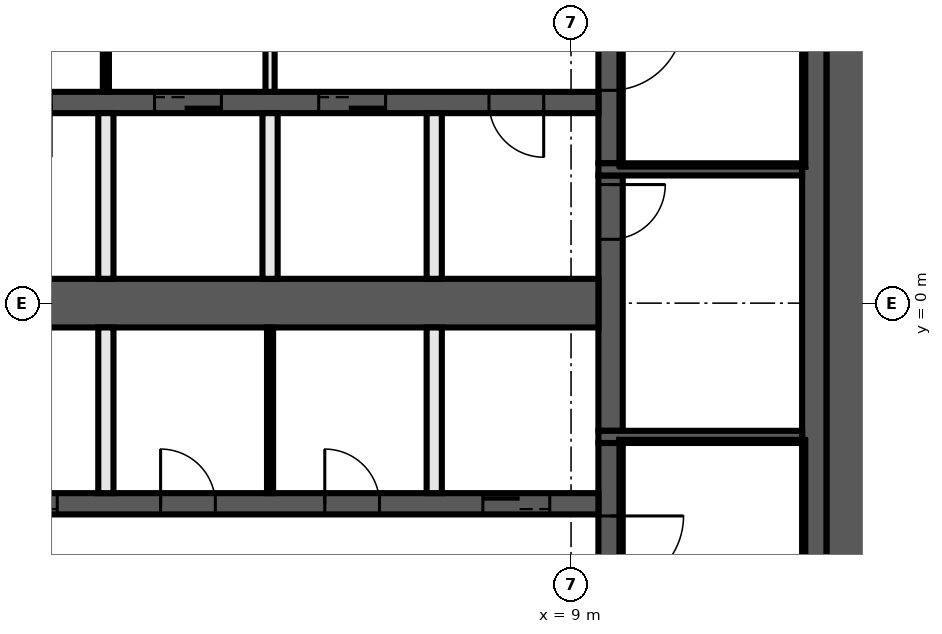
"""IFC4 building model, lengths in metres.
Left out: names, types, materials, properties, quantities, classifications, styles, units other than length and angle.
Written with IfcOpenShell. Run it as: python <this file> out.ifc"""

import sys

from ifc_helpers import new_model, si_unit, direction, frame, frame_2d, origin, place, context, subcontext, project, spatial, rectangle, extrude, element, fill, save


model = new_model("IFC4")
c1 = context("Model", 3, precision=1e-05, world=origin(), true_north=direction((0.0, 1.0)))
c2 = subcontext(c1, "Body", "Model", "MODEL_VIEW")
j1 = project(units=[si_unit("LENGTHUNIT", "METRE"), si_unit("PLANEANGLEUNIT", "RADIAN")], contexts=[c1])
p1 = place(None, origin())
s1 = spatial("IfcSite", under=j1, at=p1, CompositionType="ELEMENT")
p2 = place(p1, origin())
s2 = spatial("IfcBuilding", under=s1, at=p2, CompositionType="ELEMENT")
p3 = place(p2, frame((0.0, 0.0, 220.6)))
s3 = spatial("IfcBuildingStorey", under=s2, at=p3, CompositionType="ELEMENT", Elevation=220.6)
p4 = place(p3, frame((13.6, 10.2, 0.0), z_axis=(0.0, 0.0, 1.0), x_axis=(0.0, -1.0, 0.0)))
e1 = element("IfcWall", 1, at=p4, inside=s3, PredefinedType="SHEAR", context=c2, shape_type="SweptSolid", body=[
    extrude(rectangle(XDim=20.4, YDim=0.8, at=frame_2d((10.2, 0.0))), origin(), (0.0, 0.0, 1.0), 7.55),
])
p5 = place(p3, frame((13.0, 9.8, 0.0), z_axis=(0.0, 0.0, 1.0), x_axis=(0.0, -1.0, 0.0)))
e2 = element("IfcWall", 2, at=p5, inside=s3, PredefinedType="SHEAR", context=c2, shape_type="SweptSolid", body=[
    extrude(rectangle(XDim=19.6, YDim=0.4, at=frame_2d((9.8, 0.0))), origin(), (0.0, 0.0, 1.0), 7.55),
])
p6 = place(p3, frame((9.65, -2.3, 0.0), z_axis=(0.0, 0.0, 1.0), x_axis=(0.0, -1.0, 0.0)))
e3 = element("IfcWall", 3, at=p6, inside=s3, PredefinedType="SHEAR", context=c2, shape_type="SweptSolid", body=[
    extrude(rectangle(XDim=7.5, YDim=0.4, at=frame_2d((3.75, 0.0))), origin(), (0.0, 0.0, 1.0), 7.55),
])
p7 = place(p6, frame((1.2, 0.0, 0.0)))
e4 = element("IfcOpeningElement", 4, at=p7, cuts=e3, PredefinedType="OPENING", context=c2, shape_type="SweptSolid", body=[
    extrude(rectangle(XDim=1.2, YDim=2.1, at=frame_2d((0.6, 1.05))), frame((0.0, 0.21, 0.0), z_axis=(0.0, -1.0, 0.0), x_axis=(1.0, 0.0, 0.0)), (0.0, 0.0, 1.0), 0.42),
])
p8 = place(p3, frame((9.65, 2.1, 0.0), z_axis=(0.0, 0.0, 1.0), x_axis=(0.0, -1.0, 0.0)))
e5 = element("IfcWall", 5, at=p8, inside=s3, PredefinedType="SHEAR", context=c2, shape_type="SweptSolid", body=[
    extrude(rectangle(XDim=4.2, YDim=0.4, at=frame_2d((2.1, 0.0))), origin(), (0.0, 0.0, 1.0), 7.55),
])
p9 = place(p8, frame((0.15, 0.0, 0.0)))
e6 = element("IfcOpeningElement", 6, at=p9, cuts=e5, PredefinedType="OPENING", context=c2, shape_type="SweptSolid", body=[
    extrude(rectangle(XDim=0.9, YDim=2.1, at=frame_2d((0.45, 1.05))), frame((0.0, 0.21, 0.0), z_axis=(0.0, -1.0, 0.0), x_axis=(1.0, 0.0, 0.0)), (0.0, 0.0, 1.0), 0.42),
])
p10 = place(p3, frame((9.65, 9.8, 0.0), z_axis=(0.0, 0.0, 1.0), x_axis=(0.0, -1.0, 0.0)))
e7 = element("IfcWall", 7, at=p10, inside=s3, PredefinedType="SHEAR", context=c2, shape_type="SweptSolid", body=[
    extrude(rectangle(XDim=7.5, YDim=0.4, at=frame_2d((3.75, 0.0))), origin(), (0.0, 0.0, 1.0), 7.55),
])
p11 = place(p10, frame((5.1, 0.0, 0.0)))
e8 = element("IfcOpeningElement", 8, at=p11, cuts=e7, PredefinedType="OPENING", context=c2, shape_type="SweptSolid", body=[
    extrude(rectangle(XDim=1.2, YDim=2.1, at=frame_2d((0.6, 1.05))), frame((0.0, 0.21, 0.0), z_axis=(0.0, -1.0, 0.0), x_axis=(1.0, 0.0, 0.0)), (0.0, 0.0, 1.0), 0.42),
])
for number, where, z_axis, x_axis in (
    (9, (9.45, 2.2, 0.0), (0.0, 0.0, 1.0), (1.0, 0.0, 0.0)),
    (10, (9.45, -2.2, 0.0), (0.0, 0.0, 1.0), (1.0, 0.0, 0.0)),
):
    element("IfcWall", number, at=place(p3, frame(where, z_axis=z_axis, x_axis=x_axis)), inside=s3, PredefinedType="SHEAR", context=c2, shape_type="SweptSolid", body=[
        extrude(rectangle(XDim=3.35, YDim=0.2, at=frame_2d((1.675, 0.0))), origin(), (0.0, 0.0, 1.0), 7.55),
    ])
p12 = place(p3, frame((9.45, 3.3, 0.0), z_axis=(0.0, 0.0, 1.0), x_axis=(-1.0, 0.0, 0.0)))
e11 = element("IfcWall", 11, at=p12, inside=s3, PredefinedType="SHEAR", context=c2, shape_type="SweptSolid", body=[
    extrude(rectangle(XDim=18.9, YDim=0.35, at=frame_2d((9.45, 0.0))), origin(), (0.0, 0.0, 1.0), 7.55),
])
p13 = place(p12, frame((6.2, 0.0, 0.0)))
e12 = element("IfcOpeningElement", 12, at=p13, cuts=e11, PredefinedType="OPENING", context=c2, shape_type="SweptSolid", body=[
    extrude(rectangle(XDim=1.1, YDim=2.1, at=frame_2d((0.55, 1.05))), frame((0.0, 0.185, 0.0), z_axis=(0.0, -1.0, 0.0), x_axis=(1.0, 0.0, 0.0)), (0.0, 0.0, 1.0), 0.37),
])
p14 = place(p12, frame((3.5, 0.0, 0.0)))
e13 = element("IfcOpeningElement", 13, at=p14, cuts=e11, PredefinedType="OPENING", context=c2, shape_type="SweptSolid", body=[
    extrude(rectangle(XDim=1.1, YDim=2.1, at=frame_2d((0.55, 1.05))), frame((0.0, 0.185, 0.0), z_axis=(0.0, -1.0, 0.0), x_axis=(1.0, 0.0, 0.0)), (0.0, 0.0, 1.0), 0.37),
])
p15 = place(p12, frame((0.9, 0.0, 0.0)))
e14 = element("IfcOpeningElement", 14, at=p15, cuts=e11, PredefinedType="OPENING", context=c2, shape_type="SweptSolid", body=[
    extrude(rectangle(XDim=0.9, YDim=2.1, at=frame_2d((0.45, 1.05))), frame((0.0, 0.185, 0.0), z_axis=(0.0, -1.0, 0.0), x_axis=(1.0, 0.0, 0.0)), (0.0, 0.0, 1.0), 0.37),
])
p16 = place(p12, frame((14.4, 0.0, 0.0)))
e15 = element("IfcOpeningElement", 15, at=p16, cuts=e11, PredefinedType="OPENING", context=c2, shape_type="SweptSolid", body=[
    extrude(rectangle(XDim=0.9, YDim=2.1, at=frame_2d((0.45, 1.05))), frame((0.0, 0.185, 0.0), z_axis=(0.0, -1.0, 0.0), x_axis=(1.0, 0.0, 0.0)), (0.0, 0.0, 1.0), 0.37),
])
p17 = place(p12, frame((9.0, 0.0, 0.0)))
e16 = element("IfcOpeningElement", 16, at=p17, cuts=e11, PredefinedType="OPENING", context=c2, shape_type="SweptSolid", body=[
    extrude(rectangle(XDim=0.9, YDim=2.1, at=frame_2d((0.45, 1.05))), frame((0.0, 0.185, 0.0), z_axis=(0.0, -1.0, 0.0), x_axis=(1.0, 0.0, 0.0)), (0.0, 0.0, 1.0), 0.37),
])
p18 = place(p3, frame((-9.45, -3.3, 0.0), z_axis=(0.0, 0.0, 1.0), x_axis=(1.0, 0.0, 0.0)))
e17 = element("IfcWall", 17, at=p18, inside=s3, PredefinedType="SHEAR", context=c2, shape_type="SweptSolid", body=[
    extrude(rectangle(XDim=18.9, YDim=0.35, at=frame_2d((9.45, 0.0))), origin(), (0.0, 0.0, 1.0), 7.55),
])
p19 = place(p18, frame((0.8, 0.0, 0.0)))
e18 = element("IfcOpeningElement", 18, at=p19, cuts=e17, PredefinedType="OPENING", context=c2, shape_type="SweptSolid", body=[
    extrude(rectangle(XDim=1.1, YDim=2.1, at=frame_2d((0.55, 1.05))), frame((0.0, 0.185, 0.0), z_axis=(0.0, -1.0, 0.0), x_axis=(1.0, 0.0, 0.0)), (0.0, 0.0, 1.0), 0.37),
])
p20 = place(p18, frame((3.5, 0.0, 0.0)))
e19 = element("IfcOpeningElement", 19, at=p20, cuts=e17, PredefinedType="OPENING", context=c2, shape_type="SweptSolid", body=[
    extrude(rectangle(XDim=1.1, YDim=2.1, at=frame_2d((0.55, 1.05))), frame((0.0, 0.185, 0.0), z_axis=(0.0, -1.0, 0.0), x_axis=(1.0, 0.0, 0.0)), (0.0, 0.0, 1.0), 0.37),
])
p21 = place(p18, frame((6.2, 0.0, 0.0)))
e20 = element("IfcOpeningElement", 20, at=p21, cuts=e17, PredefinedType="OPENING", context=c2, shape_type="SweptSolid", body=[
    extrude(rectangle(XDim=1.1, YDim=2.1, at=frame_2d((0.55, 1.05))), frame((0.0, 0.185, 0.0), z_axis=(0.0, -1.0, 0.0), x_axis=(1.0, 0.0, 0.0)), (0.0, 0.0, 1.0), 0.37),
])
p22 = place(p18, frame((8.9, 0.0, 0.0)))
e21 = element("IfcOpeningElement", 21, at=p22, cuts=e17, PredefinedType="OPENING", context=c2, shape_type="SweptSolid", body=[
    extrude(rectangle(XDim=1.1, YDim=2.1, at=frame_2d((0.55, 1.05))), frame((0.0, 0.185, 0.0), z_axis=(0.0, -1.0, 0.0), x_axis=(1.0, 0.0, 0.0)), (0.0, 0.0, 1.0), 0.37),
])
p23 = place(p18, frame((17.0, 0.0, 0.0)))
e22 = element("IfcOpeningElement", 22, at=p23, cuts=e17, PredefinedType="OPENING", context=c2, shape_type="SweptSolid", body=[
    extrude(rectangle(XDim=1.1, YDim=2.1, at=frame_2d((0.55, 1.05))), frame((0.0, 0.185, 0.0), z_axis=(0.0, -1.0, 0.0), x_axis=(1.0, 0.0, 0.0)), (0.0, 0.0, 1.0), 0.37),
])
p24 = place(p18, frame((11.7, 0.0, 0.0)))
e23 = element("IfcOpeningElement", 23, at=p24, cuts=e17, PredefinedType="OPENING", context=c2, shape_type="SweptSolid", body=[
    extrude(rectangle(XDim=0.9, YDim=2.1, at=frame_2d((0.45, 1.05))), frame((0.0, 0.185, 0.0), z_axis=(0.0, -1.0, 0.0), x_axis=(1.0, 0.0, 0.0)), (0.0, 0.0, 1.0), 0.37),
])
p25 = place(p18, frame((14.4, 0.0, 0.0)))
e24 = element("IfcOpeningElement", 24, at=p25, cuts=e17, PredefinedType="OPENING", context=c2, shape_type="SweptSolid", body=[
    extrude(rectangle(XDim=0.9, YDim=2.1, at=frame_2d((0.45, 1.05))), frame((0.0, 0.185, 0.0), z_axis=(0.0, -1.0, 0.0), x_axis=(1.0, 0.0, 0.0)), (0.0, 0.0, 1.0), 0.37),
])
p26 = place(p3, frame((-9.45, 0.0, 0.0), z_axis=(0.0, 0.0, 1.0), x_axis=(1.0, 0.0, 0.0)))
e25 = element("IfcWall", 25, at=p26, inside=s3, PredefinedType="SHEAR", context=c2, shape_type="SweptSolid", body=[
    extrude(rectangle(XDim=18.9, YDim=0.8, at=frame_2d((9.45, 0.0))), origin(), (0.0, 0.0, 1.0), 7.55),
])
for number, where, z_axis, x_axis in (
    (26, (6.75, -3.125, 0.0), (0.0, 0.0, 1.0), (0.0, 1.0, 0.0)),
    (27, (6.75, 0.4, 0.0), (0.0, 0.0, 1.0), (0.0, 1.0, 0.0)),
):
    element("IfcWall", number, at=place(p3, frame(where, z_axis=z_axis, x_axis=x_axis)), inside=s3, PredefinedType="SOLIDWALL", context=c2, shape_type="SweptSolid", body=[
        extrude(rectangle(XDim=2.725, YDim=0.25, at=frame_2d((1.363, 0.0))), origin(), (0.0, 0.0, 1.0), 7.55),
    ])
p27 = place(p3, frame((4.05, 6.725, 0.0), z_axis=(0.0, 0.0, 1.0), x_axis=(0.0, -1.0, 0.0)))
e28 = element("IfcWall", 28, at=p27, inside=s3, PredefinedType="PARTITIONING", context=c2, shape_type="SweptSolid", body=[
    extrude(rectangle(XDim=3.25, YDim=0.15, at=frame_2d((1.625, 0.0))), origin(), (0.0, 0.0, 1.0), 7.55),
])
p28 = place(p27, frame((1.025, 0.0, 0.0)))
e29 = element("IfcOpeningElement", 29, at=p28, cuts=e28, PredefinedType="OPENING", context=c2, shape_type="SweptSolid", body=[
    extrude(rectangle(XDim=1.2, YDim=2.1, at=frame_2d((0.6, 1.05))), frame((0.0, 0.085, 0.0), z_axis=(0.0, -1.0, 0.0), x_axis=(1.0, 0.0, 0.0)), (0.0, 0.0, 1.0), 0.17),
])
p29 = place(p3, frame((4.05, -3.125, 0.0), z_axis=(0.0, 0.0, 1.0), x_axis=(0.0, 1.0, 0.0)))
e30 = element("IfcWall", 30, at=p29, inside=s3, PredefinedType="PARTITIONING", context=c2, shape_type="SweptSolid", body=[
    extrude(rectangle(XDim=2.725, YDim=0.1, at=frame_2d((1.363, 0.0))), origin(), (0.0, 0.0, 1.0), 7.55),
])
p30 = place(p3, frame((4.05, 0.4, 0.0), z_axis=(0.0, 0.0, 1.0), x_axis=(0.0, 1.0, 0.0)))
e31 = element("IfcWall", 31, at=p30, inside=s3, PredefinedType="SOLIDWALL", context=c2, shape_type="SweptSolid", body=[
    extrude(rectangle(XDim=2.725, YDim=0.25, at=frame_2d((1.363, 0.0))), origin(), (0.0, 0.0, 1.0), 7.55),
])
p31 = place(p3, frame((1.35, 6.725, 0.0), z_axis=(0.0, 0.0, 1.0), x_axis=(0.0, -1.0, 0.0)))
e32 = element("IfcWall", 32, at=p31, inside=s3, PredefinedType="PARTITIONING", context=c2, shape_type="SweptSolid", body=[
    extrude(rectangle(XDim=3.25, YDim=0.1, at=frame_2d((1.625, 0.0))), origin(), (0.0, 0.0, 1.0), 7.55),
])
p32 = place(p31, frame((1.025, 0.0, 0.0)))
e33 = element("IfcOpeningElement", 33, at=p32, cuts=e32, PredefinedType="OPENING", context=c2, shape_type="SweptSolid", body=[
    extrude(rectangle(XDim=1.2, YDim=2.1, at=frame_2d((0.6, 1.05))), frame((0.0, 0.06, 0.0), z_axis=(0.0, -1.0, 0.0), x_axis=(1.0, 0.0, 0.0)), (0.0, 0.0, 1.0), 0.12),
])
for number, where, z_axis, x_axis in (
    (34, (1.35, -3.125, 0.0), (0.0, 0.0, 1.0), (0.0, 1.0, 0.0)),
    (35, (1.35, 0.4, 0.0), (0.0, 0.0, 1.0), (0.0, 1.0, 0.0)),
):
    element("IfcWall", number, at=place(p3, frame(where, z_axis=z_axis, x_axis=x_axis)), inside=s3, PredefinedType="SOLIDWALL", context=c2, shape_type="SweptSolid", body=[
        extrude(rectangle(XDim=2.725, YDim=0.25, at=frame_2d((1.363, 0.0))), origin(), (0.0, 0.0, 1.0), 7.55),
    ])
p33 = place(p9, origin())
e36 = element("IfcDoor", 36, at=p33, inside=s3, OperationType="SINGLE_SWING_RIGHT", PredefinedType="DOOR", context=c2, shape_type="SweptSolid", body=[
    extrude(rectangle(XDim=0.9, YDim=2.1, at=frame_2d((0.45, 1.05))), frame((0.0, 0.025, 0.0), z_axis=(0.0, -1.0, 0.0), x_axis=(1.0, 0.0, 0.0)), (0.0, 0.0, 1.0), 0.05),
])
fill(e6, e36)
p34 = place(p13, origin())
e37 = element("IfcDoor", 37, at=p34, inside=s3, OperationType="DOUBLE_DOOR_SLIDING", PredefinedType="DOOR", context=c2, shape_type="SweptSolid", body=[
    extrude(rectangle(XDim=1.1, YDim=2.1, at=frame_2d((0.55, 1.05))), frame((0.0, 0.025, 0.0), z_axis=(0.0, -1.0, 0.0), x_axis=(1.0, 0.0, 0.0)), (0.0, 0.0, 1.0), 0.05),
])
fill(e12, e37)
p35 = place(p14, origin())
e38 = element("IfcDoor", 38, at=p35, inside=s3, OperationType="DOUBLE_DOOR_SLIDING", PredefinedType="DOOR", context=c2, shape_type="SweptSolid", body=[
    extrude(rectangle(XDim=1.1, YDim=2.1, at=frame_2d((0.55, 1.05))), frame((0.0, 0.025, 0.0), z_axis=(0.0, -1.0, 0.0), x_axis=(1.0, 0.0, 0.0)), (0.0, 0.0, 1.0), 0.05),
])
fill(e13, e38)
p36 = place(p15, origin())
e39 = element("IfcDoor", 39, at=p36, inside=s3, OperationType="SINGLE_SWING_LEFT", PredefinedType="DOOR", context=c2, shape_type="SweptSolid", body=[
    extrude(rectangle(XDim=0.9, YDim=2.1, at=frame_2d((0.45, 1.05))), frame((0.0, 0.025, 0.0), z_axis=(0.0, -1.0, 0.0), x_axis=(1.0, 0.0, 0.0)), (0.0, 0.0, 1.0), 0.05),
])
fill(e14, e39)
p37 = place(p22, origin())
e40 = element("IfcDoor", 40, at=p37, inside=s3, OperationType="DOUBLE_DOOR_SLIDING", PredefinedType="DOOR", context=c2, shape_type="SweptSolid", body=[
    extrude(rectangle(XDim=1.1, YDim=2.1, at=frame_2d((0.55, 1.05))), frame((0.0, 0.025, 0.0), z_axis=(0.0, -1.0, 0.0), x_axis=(1.0, 0.0, 0.0)), (0.0, 0.0, 1.0), 0.05),
])
fill(e21, e40)
p38 = place(p23, origin())
e41 = element("IfcDoor", 41, at=p38, inside=s3, OperationType="DOUBLE_DOOR_SLIDING", PredefinedType="DOOR", context=c2, shape_type="SweptSolid", body=[
    extrude(rectangle(XDim=1.1, YDim=2.1, at=frame_2d((0.55, 1.05))), frame((0.0, 0.025, 0.0), z_axis=(0.0, -1.0, 0.0), x_axis=(1.0, 0.0, 0.0)), (0.0, 0.0, 1.0), 0.05),
])
fill(e22, e41)
p39 = place(p24, origin())
e42 = element("IfcDoor", 42, at=p39, inside=s3, OperationType="SINGLE_SWING_LEFT", PredefinedType="DOOR", context=c2, shape_type="SweptSolid", body=[
    extrude(rectangle(XDim=0.9, YDim=2.1, at=frame_2d((0.45, 1.05))), frame((0.0, 0.025, 0.0), z_axis=(0.0, -1.0, 0.0), x_axis=(1.0, 0.0, 0.0)), (0.0, 0.0, 1.0), 0.05),
])
fill(e23, e42)
p40 = place(p25, origin())
e43 = element("IfcDoor", 43, at=p40, inside=s3, OperationType="SINGLE_SWING_RIGHT", PredefinedType="DOOR", context=c2, shape_type="SweptSolid", body=[
    extrude(rectangle(XDim=0.9, YDim=2.1, at=frame_2d((0.45, 1.05))), frame((0.0, 0.025, 0.0), z_axis=(0.0, -1.0, 0.0), x_axis=(1.0, 0.0, 0.0)), (0.0, 0.0, 1.0), 0.05),
])
fill(e24, e43)
p41 = place(p11, origin())
e44 = element("IfcDoor", 44, at=p41, inside=s3, OperationType="SINGLE_SWING_LEFT", PredefinedType="DOOR", context=c2, shape_type="SweptSolid", body=[
    extrude(rectangle(XDim=1.2, YDim=2.1, at=frame_2d((0.6, 1.05))), frame((0.0, 0.025, 0.0), z_axis=(0.0, -1.0, 0.0), x_axis=(1.0, 0.0, 0.0)), (0.0, 0.0, 1.0), 0.05),
])
fill(e8, e44)
p42 = place(p7, origin())
e45 = element("IfcDoor", 45, at=p42, inside=s3, OperationType="SINGLE_SWING_RIGHT", PredefinedType="DOOR", context=c2, shape_type="SweptSolid", body=[
    extrude(rectangle(XDim=1.2, YDim=2.1, at=frame_2d((0.6, 1.05))), frame((0.0, 0.025, 0.0), z_axis=(0.0, -1.0, 0.0), x_axis=(1.0, 0.0, 0.0)), (0.0, 0.0, 1.0), 0.05),
])
fill(e4, e45)
save(model, sys.argv[1])
